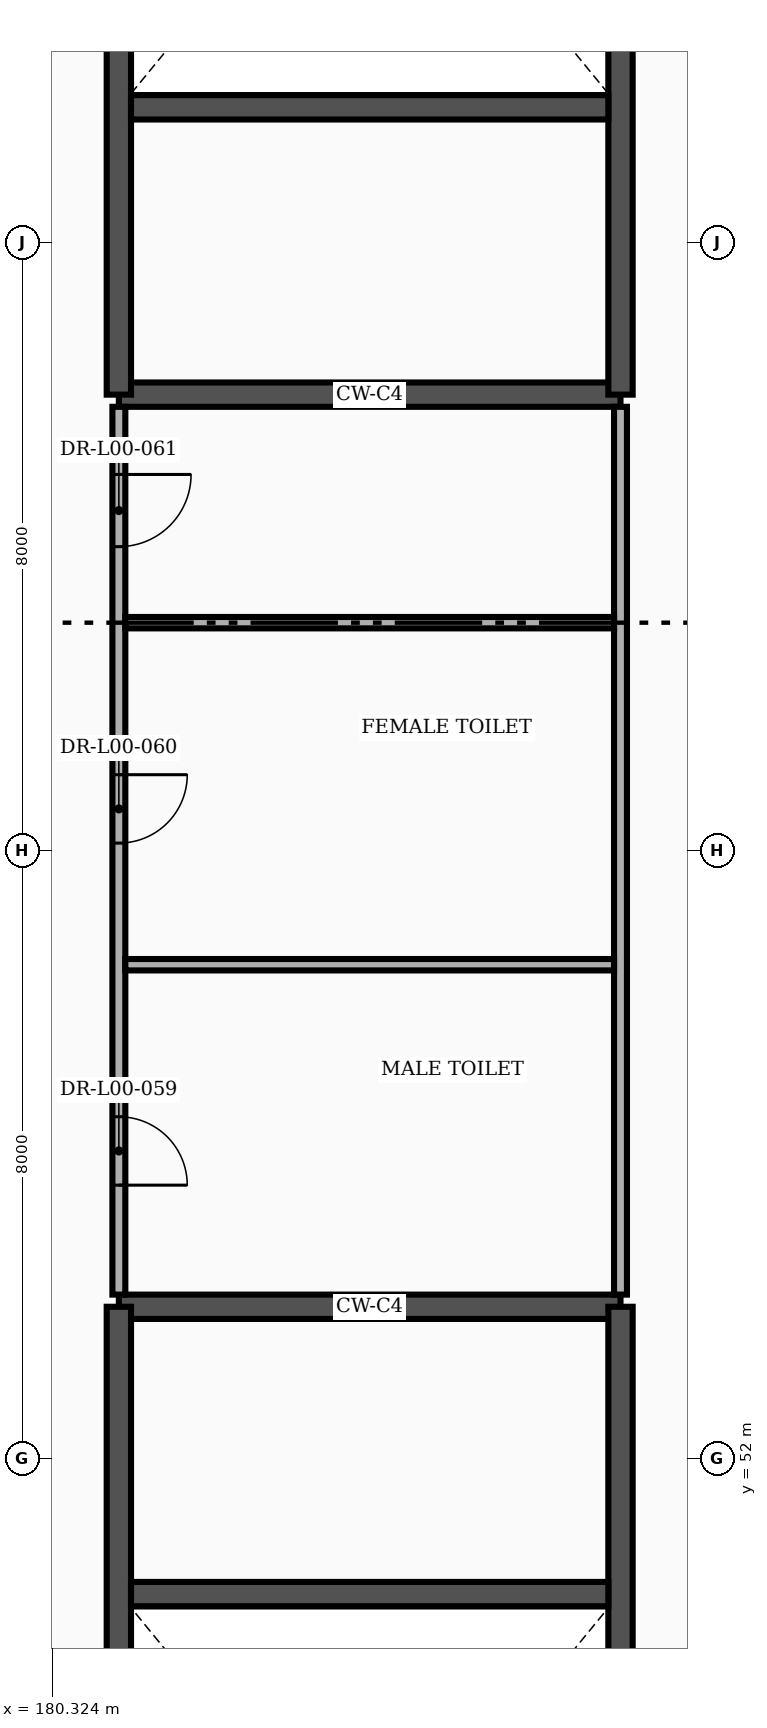
"""IFC4 building model, lengths in metres.
Left out: names, types, materials, properties, quantities, classifications, styles, units other than length and angle.
Written with IfcOpenShell. Run it as: python <this file> out.ifc"""

import sys

from ifc_helpers import new_model, si_unit, direction, frame, frame_2d, origin, place, context, subcontext, project, spatial, rectangle, extrude, element, fill, save


model = new_model("IFC4")
c1 = context("Model", 3, precision=1e-05, world=origin(), true_north=direction((0.0, 1.0)))
c2 = subcontext(c1, "Body", "Model", "MODEL_VIEW")
j1 = project(units=[si_unit("LENGTHUNIT", "METRE"), si_unit("PLANEANGLEUNIT", "RADIAN")], contexts=[c1])
p1 = place(None, origin())
s1 = spatial("IfcSite", under=j1, at=p1, CompositionType="ELEMENT")
p2 = place(p1, origin())
s2 = spatial("IfcBuilding", under=s1, at=p2, CompositionType="ELEMENT")
p3 = place(p2, origin())
s3 = spatial("IfcBuildingStorey", under=s2, at=p3, CompositionType="ELEMENT", Elevation=0.0)
p4 = place(p3, frame((181.2, 54.0, 0.0), z_axis=(0.0, 0.0, 1.0), x_axis=(1.0, 0.0, 0.0)))
e1 = element("IfcWall", 1, at=p4, inside=s3, PredefinedType="SHEAR", context=c2, shape_type="SweptSolid", body=[
    extrude(rectangle(XDim=6.6, YDim=0.32, at=frame_2d((3.3, 0.0))), origin(), (0.0, 0.0, 1.0), 5.75),
])
p5 = place(p3, frame((181.2, 39.4, 0.0), z_axis=(0.0, 0.0, 1.0), x_axis=(0.0, 1.0, 0.0)))
e2 = element("IfcWall", 2, at=p5, inside=s3, PredefinedType="SHEAR", context=c2, shape_type="SweptSolid", body=[
    extrude(rectangle(XDim=14.6, YDim=0.32, at=frame_2d((7.3, 0.0))), origin(), (0.0, 0.0, 1.0), 5.75),
])
p6 = place(p3, frame((187.8, 39.4, 0.0), z_axis=(0.0, 0.0, 1.0), x_axis=(0.0, 1.0, 0.0)))
e3 = element("IfcWall", 3, at=p6, inside=s3, PredefinedType="SHEAR", context=c2, shape_type="SweptSolid", body=[
    extrude(rectangle(XDim=14.6, YDim=0.32, at=frame_2d((7.3, 0.0))), origin(), (0.0, 0.0, 1.0), 5.75),
])
p7 = place(p6, frame((0.55, 0.0, 0.0)))
e4 = element("IfcOpeningElement", 4, at=p7, cuts=e3, PredefinedType="OPENING", context=c2, shape_type="SweptSolid", body=[
    extrude(rectangle(XDim=3.0, YDim=2.25, at=frame_2d((1.5, 1.125))), frame((0.0, 0.172, 0.0), z_axis=(0.0, -1.0, 0.0), x_axis=(1.0, 0.0, 0.0)), (0.0, 0.0, 1.0), 0.344),
])
p8 = place(p3, frame((181.36, 50.22, 0.0), z_axis=(0.0, 0.0, 1.0), x_axis=(1.0, 0.0, 0.0)))
e5 = element("IfcWall", 5, at=p8, inside=s3, PredefinedType="SHEAR", context=c2, shape_type="SweptSolid", body=[
    extrude(rectangle(XDim=6.28, YDim=0.32, at=frame_2d((3.14, 0.0))), origin(), (0.0, 0.0, 1.0), 5.75),
])
p9 = place(p3, frame((181.2, 66.0, 0.0), z_axis=(0.0, 0.0, 1.0), x_axis=(1.0, 0.0, 0.0)))
e6 = element("IfcWall", 6, at=p9, inside=s3, PredefinedType="SHEAR", context=c2, shape_type="SweptSolid", body=[
    extrude(rectangle(XDim=6.6, YDim=0.32, at=frame_2d((3.3, 0.0))), origin(), (0.0, 0.0, 1.0), 5.75),
])
p10 = place(p3, frame((181.2, 66.0, 0.0), z_axis=(0.0, 0.0, 1.0), x_axis=(0.0, 1.0, 0.0)))
e7 = element("IfcWall", 7, at=p10, inside=s3, PredefinedType="SHEAR", context=c2, shape_type="SweptSolid", body=[
    extrude(rectangle(XDim=14.6, YDim=0.32, at=frame_2d((7.3, 0.0))), origin(), (0.0, 0.0, 1.0), 5.75),
])
p11 = place(p3, frame((187.8, 66.0, 0.0), z_axis=(0.0, 0.0, 1.0), x_axis=(0.0, 1.0, 0.0)))
e8 = element("IfcWall", 8, at=p11, inside=s3, PredefinedType="SHEAR", context=c2, shape_type="SweptSolid", body=[
    extrude(rectangle(XDim=14.6, YDim=0.32, at=frame_2d((7.3, 0.0))), origin(), (0.0, 0.0, 1.0), 5.75),
])
p12 = place(p11, frame((11.05, 0.0, 0.0)))
e9 = element("IfcOpeningElement", 9, at=p12, cuts=e8, PredefinedType="OPENING", context=c2, shape_type="SweptSolid", body=[
    extrude(rectangle(XDim=3.0, YDim=2.25, at=frame_2d((1.5, 1.125))), frame((0.0, 0.172, 0.0), z_axis=(0.0, -1.0, 0.0), x_axis=(1.0, 0.0, 0.0)), (0.0, 0.0, 1.0), 0.344),
])
p13 = place(p3, frame((181.36, 69.78, 0.0), z_axis=(0.0, 0.0, 1.0), x_axis=(1.0, 0.0, 0.0)))
e10 = element("IfcWall", 10, at=p13, inside=s3, PredefinedType="SHEAR", context=c2, shape_type="SweptSolid", body=[
    extrude(rectangle(XDim=6.28, YDim=0.32, at=frame_2d((3.14, 0.0))), origin(), (0.0, 0.0, 1.0), 5.75),
])
p14 = place(p3, frame((187.8, 54.16, 0.0), z_axis=(0.0, 0.0, 1.0), x_axis=(0.0, 1.0, 0.0)))
e11 = element("IfcWall", 11, at=p14, inside=s3, PredefinedType="PARTITIONING", context=c2, shape_type="SweptSolid", body=[
    extrude(rectangle(XDim=11.68, YDim=0.17, at=frame_2d((5.84, 0.0))), origin(), (0.0, 0.0, 1.0), 5.75),
])
p15 = place(p3, frame((181.2, 54.16, 0.0), z_axis=(0.0, 0.0, 1.0), x_axis=(0.0, 1.0, 0.0)))
e12 = element("IfcWall", 12, at=p15, inside=s3, PredefinedType="PARTITIONING", context=c2, shape_type="SweptSolid", body=[
    extrude(rectangle(XDim=11.68, YDim=0.17, at=frame_2d((5.84, 0.0))), origin(), (0.0, 0.0, 1.0), 5.75),
])
p16 = place(p15, frame((1.44, 0.0, 0.0)))
e13 = element("IfcOpeningElement", 13, at=p16, cuts=e12, PredefinedType="OPENING", context=c2, shape_type="SweptSolid", body=[
    extrude(rectangle(XDim=0.9, YDim=2.1, at=frame_2d((0.45, 1.05))), frame((0.0, 0.097, 0.0), z_axis=(0.0, -1.0, 0.0), x_axis=(1.0, 0.0, 0.0)), (0.0, 0.0, 1.0), 0.194),
])
p17 = place(p15, frame((5.94, 0.0, 0.0)))
e14 = element("IfcOpeningElement", 14, at=p17, cuts=e12, PredefinedType="OPENING", context=c2, shape_type="SweptSolid", body=[
    extrude(rectangle(XDim=0.9, YDim=2.1, at=frame_2d((0.45, 1.05))), frame((0.0, 0.097, 0.0), z_axis=(0.0, -1.0, 0.0), x_axis=(1.0, 0.0, 0.0)), (0.0, 0.0, 1.0), 0.194),
])
p18 = place(p15, frame((9.84, 0.0, 0.0)))
e15 = element("IfcOpeningElement", 15, at=p18, cuts=e12, PredefinedType="OPENING", context=c2, shape_type="SweptSolid", body=[
    extrude(rectangle(XDim=0.95, YDim=2.1, at=frame_2d((0.475, 1.05))), frame((0.0, 0.097, 0.0), z_axis=(0.0, -1.0, 0.0), x_axis=(1.0, 0.0, 0.0)), (0.0, 0.0, 1.0), 0.194),
])
for number, where, z_axis, x_axis in (
    (16, (181.285, 58.5, 0.0), (0.0, 0.0, 1.0), (1.0, 0.0, 0.0)),
    (17, (181.285, 63.0, 0.0), (0.0, 0.0, 1.0), (1.0, 0.0, 0.0)),
):
    element("IfcWall", number, at=place(p3, frame(where, z_axis=z_axis, x_axis=x_axis)), inside=s3, PredefinedType="PARTITIONING", context=c2, shape_type="SweptSolid", body=[
        extrude(rectangle(XDim=6.43, YDim=0.15, at=frame_2d((3.215, 0.0))), origin(), (0.0, 0.0, 1.0), 5.75),
    ])
p19 = place(p16, frame((0.9, 0.0, 0.0), z_axis=(0.0, 0.0, 1.0), x_axis=(-1.0, 0.0, 0.0)))
e18 = element("IfcDoor", 18, at=p19, inside=s3, OperationType="SINGLE_SWING_RIGHT", PredefinedType="DOOR", context=c2, shape_type="SweptSolid", body=[
    extrude(rectangle(XDim=0.9, YDim=2.1, at=frame_2d((0.45, 1.05))), frame((0.0, 0.025, 0.0), z_axis=(0.0, -1.0, 0.0), x_axis=(1.0, 0.0, 0.0)), (0.0, 0.0, 1.0), 0.05),
])
fill(e13, e18)
p20 = place(p17, frame((0.9, 0.0, 0.0), z_axis=(0.0, 0.0, 1.0), x_axis=(-1.0, 0.0, 0.0)))
e19 = element("IfcDoor", 19, at=p20, inside=s3, OperationType="SINGLE_SWING_LEFT", PredefinedType="DOOR", context=c2, shape_type="SweptSolid", body=[
    extrude(rectangle(XDim=0.9, YDim=2.1, at=frame_2d((0.45, 1.05))), frame((0.0, 0.025, 0.0), z_axis=(0.0, -1.0, 0.0), x_axis=(1.0, 0.0, 0.0)), (0.0, 0.0, 1.0), 0.05),
])
fill(e14, e19)
p21 = place(p18, frame((0.95, 0.0, 0.0), z_axis=(0.0, 0.0, 1.0), x_axis=(-1.0, 0.0, 0.0)))
e20 = element("IfcDoor", 20, at=p21, inside=s3, OperationType="SINGLE_SWING_LEFT", PredefinedType="DOOR", context=c2, shape_type="SweptSolid", body=[
    extrude(rectangle(XDim=0.95, YDim=2.1, at=frame_2d((0.475, 1.05))), frame((0.0, 0.025, 0.0), z_axis=(0.0, -1.0, 0.0), x_axis=(1.0, 0.0, 0.0)), (0.0, 0.0, 1.0), 0.05),
])
fill(e15, e20)
save(model, sys.argv[1])
